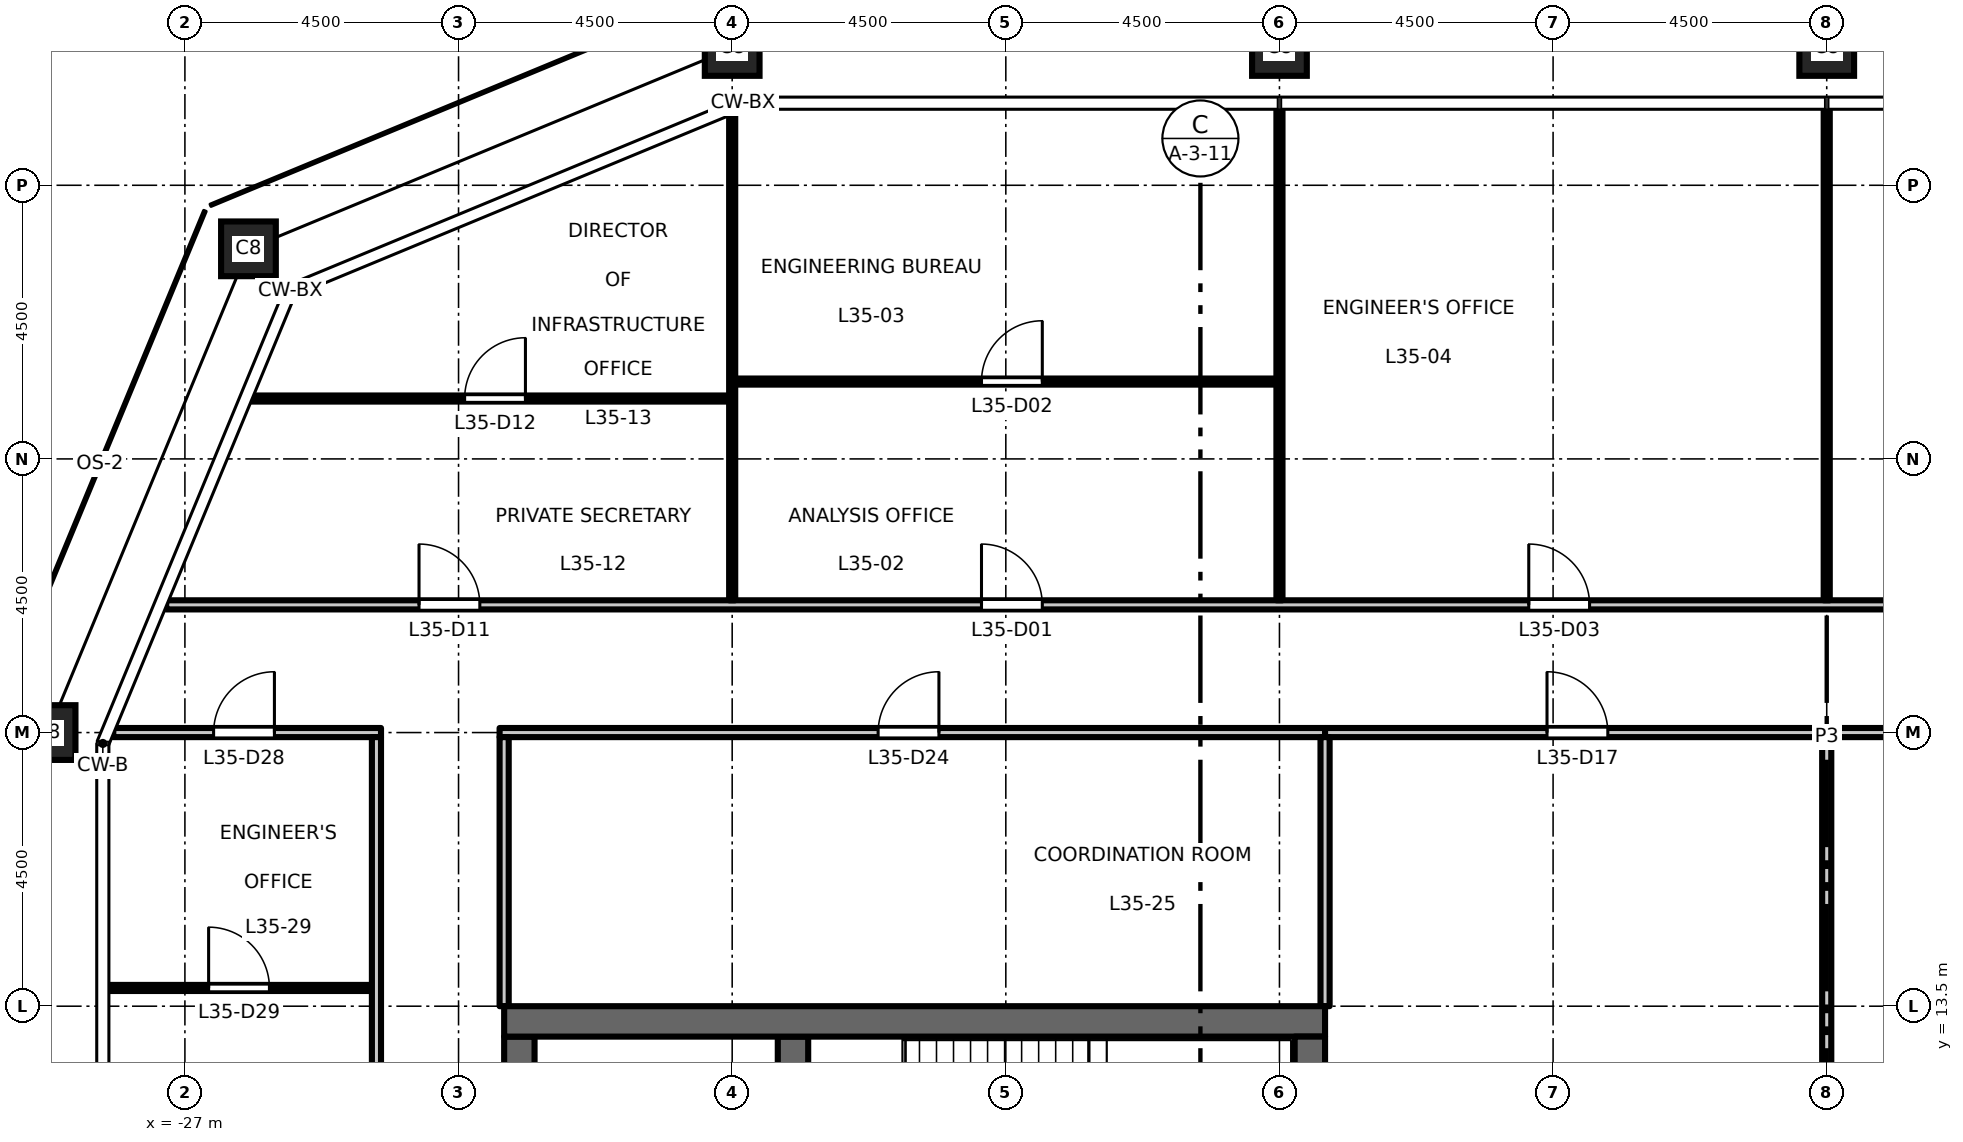
"""IFC4 building model, lengths in metres.
Left out: names, types, materials, properties, quantities, classifications, styles, units other than length and angle.
Written with IfcOpenShell. Run it as: python <this file> out.ifc"""

import sys

from ifc_helpers import new_model, si_unit, direction, frame, frame_2d, origin, origin_2d, place, context, subcontext, project, spatial, rectangle, hollow_rectangle, extrude, element, fill, save


model = new_model("IFC4")
c1 = context("Model", 3, precision=1e-05, world=origin(), true_north=direction((0.0, 1.0)))
c2 = subcontext(c1, "Body", "Model", "MODEL_VIEW")
j1 = project(units=[si_unit("LENGTHUNIT", "METRE"), si_unit("PLANEANGLEUNIT", "RADIAN")], contexts=[c1])
p1 = place(None, origin())
s1 = spatial("IfcSite", under=j1, at=p1, CompositionType="ELEMENT")
p2 = place(p1, origin())
s2 = spatial("IfcBuilding", under=s1, at=p2, CompositionType="ELEMENT")
p3 = place(p2, frame((0.0, 0.0, 163.2)))
s3 = spatial("IfcBuildingStorey", under=s2, at=p3, CompositionType="ELEMENT", Elevation=163.2)
for number, where, z_axis, x_axis in (
    (1, (0.0, 29.25, 0.0), (0.0, 0.0, 1.0), (1.0, 0.0, 0.0)),
    (2, (-9.0, 29.25, 0.0), (0.0, 0.0, 1.0), (1.0, 0.0, 0.0)),
    (3, (-18.0, 29.25, 0.0), (0.0, 0.0, 1.0), (1.0, 0.0, 0.0)),
    (4, (-25.955, 25.955, 0.0), (0.0, 0.0, 1.0), (1.0, 0.0, 0.0)),
    (5, (-29.25, 18.0, 0.0), (0.0, 0.0, 1.0), (1.0, 0.0, 0.0)),
):
    element("IfcColumn", number, at=place(p3, frame(where, z_axis=z_axis, x_axis=x_axis)), inside=s3, PredefinedType="COLUMN", context=c2, shape_type="SweptSolid", body=[
        extrude(hollow_rectangle(XDim=0.9, YDim=0.9, WallThickness=0.05, at=origin_2d()), origin(), (0.0, 0.0, 1.0), 4.5),
    ])
p4 = place(p3, frame((-21.5, -13.0, 0.0), z_axis=(0.0, 0.0, 1.0), x_axis=(0.0, 1.0, 0.0)))
e6 = element("IfcWall", 6, at=p4, inside=s3, PredefinedType="SHEAR", context=c2, shape_type="SweptSolid", body=[
    extrude(rectangle(XDim=26.0, YDim=0.5, at=frame_2d((13.0, 0.0))), origin(), (0.0, 0.0, 1.0), 4.35),
])
p5 = place(p4, frame((16.825, 0.0, 0.0)))
e7 = element("IfcOpeningElement", 7, at=p5, cuts=e6, PredefinedType="OPENING", context=c2, shape_type="SweptSolid", body=[
    extrude(rectangle(XDim=1.8, YDim=2.1, at=frame_2d((0.9, 1.05))), frame((0.0, 0.26, 0.0), z_axis=(0.0, -1.0, 0.0), x_axis=(1.0, 0.0, 0.0)), (0.0, 0.0, 1.0), 0.52),
])
p6 = place(p4, frame((7.375, 0.0, 0.0)))
e8 = element("IfcOpeningElement", 8, at=p6, cuts=e6, PredefinedType="OPENING", context=c2, shape_type="SweptSolid", body=[
    extrude(rectangle(XDim=1.8, YDim=2.1, at=frame_2d((0.9, 1.05))), frame((0.0, 0.26, 0.0), z_axis=(0.0, -1.0, 0.0), x_axis=(1.0, 0.0, 0.0)), (0.0, 0.0, 1.0), 0.52),
])
p7 = place(p4, frame((2.65, 0.0, 0.0)))
e9 = element("IfcOpeningElement", 9, at=p7, cuts=e6, PredefinedType="OPENING", context=c2, shape_type="SweptSolid", body=[
    extrude(rectangle(XDim=0.9, YDim=2.1, at=frame_2d((0.45, 1.05))), frame((0.0, 0.26, 0.0), z_axis=(0.0, -1.0, 0.0), x_axis=(1.0, 0.0, 0.0)), (0.0, 0.0, 1.0), 0.52),
])
p8 = place(p3, frame((-17.0, 6.425, 0.0), z_axis=(0.0, 0.0, 1.0), x_axis=(0.0, 1.0, 0.0)))
e10 = element("IfcWall", 10, at=p8, inside=s3, PredefinedType="SHEAR", context=c2, shape_type="SweptSolid", body=[
    extrude(rectangle(XDim=6.575, YDim=0.5, at=frame_2d((3.288, 0.0))), origin(), (0.0, 0.0, 1.0), 4.35),
])
p9 = place(p3, frame((-8.25, 13.25, 0.0), z_axis=(0.0, 0.0, 1.0), x_axis=(-1.0, 0.0, 0.0)))
e11 = element("IfcWall", 11, at=p9, inside=s3, PredefinedType="SHEAR", context=c2, shape_type="SweptSolid", body=[
    extrude(rectangle(XDim=13.5, YDim=0.5, at=frame_2d((6.75, 0.0))), origin(), (0.0, 0.0, 1.0), 4.35),
])
p10 = place(p3, frame((-8.5, -13.0, 0.0), z_axis=(0.0, 0.0, 1.0), x_axis=(0.0, 1.0, 0.0)))
e12 = element("IfcWall", 12, at=p10, inside=s3, PredefinedType="SHEAR", context=c2, shape_type="SweptSolid", body=[
    extrude(rectangle(XDim=26.0, YDim=0.5, at=frame_2d((13.0, 0.0))), origin(), (0.0, 0.0, 1.0), 4.35),
])
p11 = place(p3, frame((-28.26, 13.8, 0.0), z_axis=(0.0, 0.0, 1.0), x_axis=(1.0, 0.0, 0.0)))
e13 = element("IfcWall", 13, at=p11, inside=s3, PredefinedType="PARTITIONING", context=c2, shape_type="SweptSolid", body=[
    extrude(rectangle(XDim=4.335, YDim=0.1, at=frame_2d((2.167, 0.0))), origin(), (0.0, 0.0, 1.0), 4.35),
])
p12 = place(p11, frame((1.65, 0.0, 0.0)))
e14 = element("IfcOpeningElement", 14, at=p12, cuts=e13, PredefinedType="OPENING", context=c2, shape_type="SweptSolid", body=[
    extrude(rectangle(XDim=1.0, YDim=2.1, at=frame_2d((0.5, 1.05))), frame((0.0, 0.06, 0.0), z_axis=(0.0, -1.0, 0.0), x_axis=(1.0, 0.0, 0.0)), (0.0, 0.0, 1.0), 0.12),
])
p13 = place(p3, frame((-28.178, 18.0, 0.0), z_axis=(0.0, 0.0, 1.0), x_axis=(1.0, 0.0, 0.0)))
e15 = element("IfcWall", 15, at=p13, inside=s3, PredefinedType="PARTITIONING", context=c2, shape_type="SweptSolid", body=[
    extrude(rectangle(XDim=4.403, YDim=0.15, at=frame_2d((2.202, 0.0))), origin(), (0.0, 0.0, 1.0), 4.35),
])
p14 = place(p13, frame((1.65, 0.0, 0.0)))
e16 = element("IfcOpeningElement", 16, at=p14, cuts=e15, PredefinedType="OPENING", context=c2, shape_type="SweptSolid", body=[
    extrude(rectangle(XDim=1.0, YDim=2.1, at=frame_2d((0.5, 1.05))), frame((0.0, 0.085, 0.0), z_axis=(0.0, -1.0, 0.0), x_axis=(1.0, 0.0, 0.0)), (0.0, 0.0, 1.0), 0.17),
])
p15 = place(p3, frame((-21.825, 18.0, 0.0), z_axis=(0.0, 0.0, 1.0), x_axis=(1.0, 0.0, 0.0)))
e17 = element("IfcWall", 17, at=p15, inside=s3, PredefinedType="PARTITIONING", context=c2, shape_type="SweptSolid", body=[
    extrude(rectangle(XDim=13.575, YDim=0.15, at=frame_2d((6.788, 0.0))), origin(), (0.0, 0.0, 1.0), 4.35),
])
p16 = place(p15, frame((6.225, 0.0, 0.0)))
e18 = element("IfcOpeningElement", 18, at=p16, cuts=e17, PredefinedType="OPENING", context=c2, shape_type="SweptSolid", body=[
    extrude(rectangle(XDim=1.0, YDim=2.1, at=frame_2d((0.5, 1.05))), frame((0.0, 0.085, 0.0), z_axis=(0.0, -1.0, 0.0), x_axis=(1.0, 0.0, 0.0)), (0.0, 0.0, 1.0), 0.17),
])
p17 = place(p3, frame((0.0, 18.0, 0.0), z_axis=(0.0, 0.0, 1.0), x_axis=(1.0, 0.0, 0.0)))
e19 = element("IfcWall", 19, at=p17, inside=s3, PredefinedType="PARTITIONING", context=c2, shape_type="SweptSolid", body=[
    extrude(rectangle(XDim=21.825, YDim=0.15, at=frame_2d((10.913, 0.0))), origin(), (0.0, 0.0, 1.0), 4.35),
])
p18 = place(p17, frame((3.65, 0.0, 0.0)))
e20 = element("IfcOpeningElement", 20, at=p18, cuts=e19, PredefinedType="OPENING", context=c2, shape_type="SweptSolid", body=[
    extrude(rectangle(XDim=1.0, YDim=2.1, at=frame_2d((0.5, 1.05))), frame((0.0, 0.085, 0.0), z_axis=(0.0, -1.0, 0.0), x_axis=(1.0, 0.0, 0.0)), (0.0, 0.0, 1.0), 0.17),
])
p19 = place(p17, frame((14.4, 0.0, 0.0)))
e21 = element("IfcOpeningElement", 21, at=p19, cuts=e19, PredefinedType="OPENING", context=c2, shape_type="SweptSolid", body=[
    extrude(rectangle(XDim=1.0, YDim=2.1, at=frame_2d((0.5, 1.05))), frame((0.0, 0.085, 0.0), z_axis=(0.0, -1.0, 0.0), x_axis=(1.0, 0.0, 0.0)), (0.0, 0.0, 1.0), 0.17),
])
p20 = place(p3, frame((-8.25, 18.0, 0.0), z_axis=(0.0, 0.0, 1.0), x_axis=(1.0, 0.0, 0.0)))
e22 = element("IfcWall", 22, at=p20, inside=s3, PredefinedType="PARTITIONING", context=c2, shape_type="SweptSolid", body=[
    extrude(rectangle(XDim=8.25, YDim=0.15, at=frame_2d((4.125, 0.0))), origin(), (0.0, 0.0, 1.0), 4.35),
])
p21 = place(p20, frame((3.65, 0.0, 0.0)))
e23 = element("IfcOpeningElement", 23, at=p21, cuts=e22, PredefinedType="OPENING", context=c2, shape_type="SweptSolid", body=[
    extrude(rectangle(XDim=1.0, YDim=2.1, at=frame_2d((0.5, 1.05))), frame((0.0, 0.085, 0.0), z_axis=(0.0, -1.0, 0.0), x_axis=(1.0, 0.0, 0.0)), (0.0, 0.0, 1.0), 0.17),
])
p22 = place(p3, frame((-27.308, 20.1, 0.0), z_axis=(0.0, 0.0, 1.0), x_axis=(1.0, 0.0, 0.0)))
e24 = element("IfcWall", 24, at=p22, inside=s3, PredefinedType="PARTITIONING", context=c2, shape_type="SweptSolid", body=[
    extrude(rectangle(XDim=54.616, YDim=0.15, at=frame_2d((27.308, 0.0))), origin(), (0.0, 0.0, 1.0), 4.35),
])
p23 = place(p22, frame((13.408, 0.0, 0.0)))
e25 = element("IfcOpeningElement", 25, at=p23, cuts=e24, PredefinedType="OPENING", context=c2, shape_type="SweptSolid", body=[
    extrude(rectangle(XDim=1.0, YDim=2.1, at=frame_2d((0.5, 1.05))), frame((0.0, 0.085, 0.0), z_axis=(0.0, -1.0, 0.0), x_axis=(1.0, 0.0, 0.0)), (0.0, 0.0, 1.0), 0.17),
])
p24 = place(p22, frame((22.408, 0.0, 0.0)))
e26 = element("IfcOpeningElement", 26, at=p24, cuts=e24, PredefinedType="OPENING", context=c2, shape_type="SweptSolid", body=[
    extrude(rectangle(XDim=1.0, YDim=2.1, at=frame_2d((0.5, 1.05))), frame((0.0, 0.085, 0.0), z_axis=(0.0, -1.0, 0.0), x_axis=(1.0, 0.0, 0.0)), (0.0, 0.0, 1.0), 0.17),
])
p25 = place(p22, frame((31.408, 0.0, 0.0)))
e27 = element("IfcOpeningElement", 27, at=p25, cuts=e24, PredefinedType="OPENING", context=c2, shape_type="SweptSolid", body=[
    extrude(rectangle(XDim=1.0, YDim=2.1, at=frame_2d((0.5, 1.05))), frame((0.0, 0.085, 0.0), z_axis=(0.0, -1.0, 0.0), x_axis=(1.0, 0.0, 0.0)), (0.0, 0.0, 1.0), 0.17),
])
p26 = place(p22, frame((40.408, 0.0, 0.0)))
e28 = element("IfcOpeningElement", 28, at=p26, cuts=e24, PredefinedType="OPENING", context=c2, shape_type="SweptSolid", body=[
    extrude(rectangle(XDim=1.0, YDim=2.1, at=frame_2d((0.5, 1.05))), frame((0.0, 0.085, 0.0), z_axis=(0.0, -1.0, 0.0), x_axis=(1.0, 0.0, 0.0)), (0.0, 0.0, 1.0), 0.17),
])
p27 = place(p22, frame((4.158, 0.0, 0.0)))
e29 = element("IfcOpeningElement", 29, at=p27, cuts=e24, PredefinedType="OPENING", context=c2, shape_type="SweptSolid", body=[
    extrude(rectangle(XDim=1.0, YDim=2.1, at=frame_2d((0.5, 1.05))), frame((0.0, 0.085, 0.0), z_axis=(0.0, -1.0, 0.0), x_axis=(1.0, 0.0, 0.0)), (0.0, 0.0, 1.0), 0.17),
])
p28 = place(p22, frame((49.466, 0.0, 0.0)))
e30 = element("IfcOpeningElement", 30, at=p28, cuts=e24, PredefinedType="OPENING", context=c2, shape_type="SweptSolid", body=[
    extrude(rectangle(XDim=1.0, YDim=2.1, at=frame_2d((0.5, 1.05))), frame((0.0, 0.085, 0.0), z_axis=(0.0, -1.0, 0.0), x_axis=(1.0, 0.0, 0.0)), (0.0, 0.0, 1.0), 0.17),
])
p29 = place(p3, frame((-25.903, 23.493, 0.0), z_axis=(0.0, 0.0, 1.0), x_axis=(1.0, 0.0, 0.0)))
e31 = element("IfcWall", 31, at=p29, inside=s3, PredefinedType="PARTITIONING", context=c2, shape_type="SweptSolid", body=[
    extrude(rectangle(XDim=7.853, YDim=0.1, at=frame_2d((3.927, 0.0))), origin(), (0.0, 0.0, 1.0), 4.35),
])
p30 = place(p29, frame((3.503, 0.0, 0.0)))
e32 = element("IfcOpeningElement", 32, at=p30, cuts=e31, PredefinedType="OPENING", context=c2, shape_type="SweptSolid", body=[
    extrude(rectangle(XDim=1.0, YDim=2.1, at=frame_2d((0.5, 1.05))), frame((0.0, 0.06, 0.0), z_axis=(0.0, -1.0, 0.0), x_axis=(1.0, 0.0, 0.0)), (0.0, 0.0, 1.0), 0.12),
])
p31 = place(p3, frame((-17.95, 23.772, 0.0), z_axis=(0.0, 0.0, 1.0), x_axis=(1.0, 0.0, 0.0)))
e33 = element("IfcWall", 33, at=p31, inside=s3, PredefinedType="PARTITIONING", context=c2, shape_type="SweptSolid", body=[
    extrude(rectangle(XDim=8.9, YDim=0.1, at=frame_2d((4.45, 0.0))), origin(), (0.0, 0.0, 1.0), 4.35),
])
p32 = place(p31, frame((4.05, 0.0, 0.0)))
e34 = element("IfcOpeningElement", 34, at=p32, cuts=e33, PredefinedType="OPENING", context=c2, shape_type="SweptSolid", body=[
    extrude(rectangle(XDim=1.0, YDim=2.1, at=frame_2d((0.5, 1.05))), frame((0.0, 0.06, 0.0), z_axis=(0.0, -1.0, 0.0), x_axis=(1.0, 0.0, 0.0)), (0.0, 0.0, 1.0), 0.12),
])
p33 = place(p3, frame((-23.85, -17.925, 0.0), z_axis=(0.0, 0.0, 1.0), x_axis=(0.0, 1.0, 0.0)))
e35 = element("IfcWall", 35, at=p33, inside=s3, PredefinedType="PARTITIONING", context=c2, shape_type="SweptSolid", body=[
    extrude(rectangle(XDim=35.85, YDim=0.15, at=frame_2d((17.925, 0.0))), origin(), (0.0, 0.0, 1.0), 4.35),
])
p34 = place(p3, frame((-21.75, 13.5, 0.0), z_axis=(0.0, 0.0, 1.0), x_axis=(0.0, 1.0, 0.0)))
e36 = element("IfcWall", 36, at=p34, inside=s3, PredefinedType="PARTITIONING", context=c2, shape_type="SweptSolid", body=[
    extrude(rectangle(XDim=4.425, YDim=0.15, at=frame_2d((2.212, 0.0))), origin(), (0.0, 0.0, 1.0), 4.35),
])
p35 = place(p3, frame((-18.0, 20.175, 0.0), z_axis=(0.0, 0.0, 1.0), x_axis=(0.0, 1.0, 0.0)))
e37 = element("IfcWall", 37, at=p35, inside=s3, PredefinedType="PARTITIONING", context=c2, shape_type="SweptSolid", body=[
    extrude(rectangle(XDim=8.003, YDim=0.1, at=frame_2d((4.001, 0.0))), origin(), (0.0, 0.0, 1.0), 3.45),
])
p36 = place(p3, frame((-9.0, 20.175, 0.0), z_axis=(0.0, 0.0, 1.0), x_axis=(0.0, 1.0, 0.0)))
e38 = element("IfcWall", 38, at=p36, inside=s3, PredefinedType="PARTITIONING", context=c2, shape_type="SweptSolid", body=[
    extrude(rectangle(XDim=8.085, YDim=0.1, at=frame_2d((4.042, 0.0))), origin(), (0.0, 0.0, 1.0), 3.45),
])
p37 = place(p3, frame((-8.25, 13.5, 0.0), z_axis=(0.0, 0.0, 1.0), x_axis=(0.0, 1.0, 0.0)))
e39 = element("IfcWall", 39, at=p37, inside=s3, PredefinedType="PARTITIONING", context=c2, shape_type="SweptSolid", body=[
    extrude(rectangle(XDim=4.425, YDim=0.15, at=frame_2d((2.212, 0.0))), origin(), (0.0, 0.0, 1.0), 4.35),
])
p38 = place(p3, frame((0.0, 20.175, 0.0), z_axis=(0.0, 0.0, 1.0), x_axis=(0.0, 1.0, 0.0)))
e40 = element("IfcWall", 40, at=p38, inside=s3, PredefinedType="PARTITIONING", context=c2, shape_type="SweptSolid", body=[
    extrude(rectangle(XDim=8.085, YDim=0.1, at=frame_2d((4.042, 0.0))), origin(), (0.0, 0.0, 1.0), 3.45),
])
p39 = place(p3, frame((0.0, 8.65, 0.0), z_axis=(0.0, 0.0, 1.0), x_axis=(0.0, 1.0, 0.0)))
e41 = element("IfcWall", 41, at=p39, inside=s3, PredefinedType="PARTITIONING", context=c2, shape_type="SweptSolid", body=[
    extrude(rectangle(XDim=9.275, YDim=0.15, at=frame_2d((4.638, 0.0))), origin(), (0.0, 0.0, 1.0), 3.45),
])
p40 = place(p23, origin())
e42 = element("IfcDoor", 42, at=p40, inside=s3, OperationType="SINGLE_SWING_LEFT", PredefinedType="DOOR", context=c2, shape_type="SweptSolid", body=[
    extrude(rectangle(XDim=1.0, YDim=2.1, at=frame_2d((0.5, 1.05))), frame((0.0, 0.025, 0.0), z_axis=(0.0, -1.0, 0.0), x_axis=(1.0, 0.0, 0.0)), (0.0, 0.0, 1.0), 0.05),
])
fill(e25, e42)
p41 = place(p32, origin())
e43 = element("IfcDoor", 43, at=p41, inside=s3, OperationType="SINGLE_SWING_RIGHT", PredefinedType="DOOR", context=c2, shape_type="SweptSolid", body=[
    extrude(rectangle(XDim=1.0, YDim=2.1, at=frame_2d((0.5, 1.05))), frame((0.0, 0.025, 0.0), z_axis=(0.0, -1.0, 0.0), x_axis=(1.0, 0.0, 0.0)), (0.0, 0.0, 1.0), 0.05),
])
fill(e34, e43)
p42 = place(p24, origin())
e44 = element("IfcDoor", 44, at=p42, inside=s3, OperationType="SINGLE_SWING_LEFT", PredefinedType="DOOR", context=c2, shape_type="SweptSolid", body=[
    extrude(rectangle(XDim=1.0, YDim=2.1, at=frame_2d((0.5, 1.05))), frame((0.0, 0.025, 0.0), z_axis=(0.0, -1.0, 0.0), x_axis=(1.0, 0.0, 0.0)), (0.0, 0.0, 1.0), 0.05),
])
fill(e26, e44)
p43 = place(p27, origin())
e45 = element("IfcDoor", 45, at=p43, inside=s3, OperationType="SINGLE_SWING_LEFT", PredefinedType="DOOR", context=c2, shape_type="SweptSolid", body=[
    extrude(rectangle(XDim=1.0, YDim=2.1, at=frame_2d((0.5, 1.05))), frame((0.0, 0.025, 0.0), z_axis=(0.0, -1.0, 0.0), x_axis=(1.0, 0.0, 0.0)), (0.0, 0.0, 1.0), 0.05),
])
fill(e29, e45)
p44 = place(p30, origin())
e46 = element("IfcDoor", 46, at=p44, inside=s3, OperationType="SINGLE_SWING_RIGHT", PredefinedType="DOOR", context=c2, shape_type="SweptSolid", body=[
    extrude(rectangle(XDim=1.0, YDim=2.1, at=frame_2d((0.5, 1.05))), frame((0.0, 0.025, 0.0), z_axis=(0.0, -1.0, 0.0), x_axis=(1.0, 0.0, 0.0)), (0.0, 0.0, 1.0), 0.05),
])
fill(e32, e46)
p45 = place(p21, origin())
e47 = element("IfcDoor", 47, at=p45, inside=s3, OperationType="SINGLE_SWING_LEFT", PredefinedType="DOOR", context=c2, shape_type="SweptSolid", body=[
    extrude(rectangle(XDim=1.0, YDim=2.1, at=frame_2d((0.5, 1.05))), frame((0.0, 0.025, 0.0), z_axis=(0.0, -1.0, 0.0), x_axis=(1.0, 0.0, 0.0)), (0.0, 0.0, 1.0), 0.05),
])
fill(e23, e47)
p46 = place(p16, origin())
e48 = element("IfcDoor", 48, at=p46, inside=s3, OperationType="SINGLE_SWING_RIGHT", PredefinedType="DOOR", context=c2, shape_type="SweptSolid", body=[
    extrude(rectangle(XDim=1.0, YDim=2.1, at=frame_2d((0.5, 1.05))), frame((0.0, 0.025, 0.0), z_axis=(0.0, -1.0, 0.0), x_axis=(1.0, 0.0, 0.0)), (0.0, 0.0, 1.0), 0.05),
])
fill(e18, e48)
p47 = place(p14, origin())
e49 = element("IfcDoor", 49, at=p47, inside=s3, OperationType="SINGLE_SWING_RIGHT", PredefinedType="DOOR", context=c2, shape_type="SweptSolid", body=[
    extrude(rectangle(XDim=1.0, YDim=2.1, at=frame_2d((0.5, 1.05))), frame((0.0, 0.025, 0.0), z_axis=(0.0, -1.0, 0.0), x_axis=(1.0, 0.0, 0.0)), (0.0, 0.0, 1.0), 0.05),
])
fill(e16, e49)
p48 = place(p12, origin())
e50 = element("IfcDoor", 50, at=p48, inside=s3, OperationType="SINGLE_SWING_LEFT", PredefinedType="DOOR", context=c2, shape_type="SweptSolid", body=[
    extrude(rectangle(XDim=1.0, YDim=2.1, at=frame_2d((0.5, 1.05))), frame((0.0, 0.025, 0.0), z_axis=(0.0, -1.0, 0.0), x_axis=(1.0, 0.0, 0.0)), (0.0, 0.0, 1.0), 0.05),
])
fill(e14, e50)
save(model, sys.argv[1])
